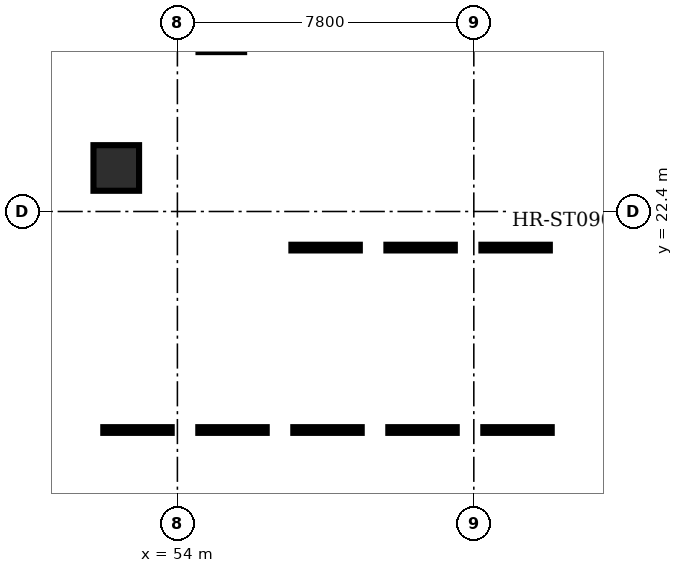
"""IFC4 building model, lengths in metres.
Left out: names, types, materials, properties, quantities, classifications, styles, units other than length and angle.
Written with IfcOpenShell. Run it as: python <this file> out.ifc"""

import sys

from ifc_helpers import new_model, si_unit, direction, frame, origin, origin_2d, place, context, subcontext, project, spatial, hollow_rectangle, extrude, element, save


model = new_model("IFC4")
c1 = context("Model", 3, precision=1e-05, world=origin(), true_north=direction((0.0, 1.0)))
c2 = subcontext(c1, "Body", "Model", "MODEL_VIEW")
j1 = project(units=[si_unit("LENGTHUNIT", "METRE"), si_unit("PLANEANGLEUNIT", "RADIAN")], contexts=[c1])
p1 = place(None, origin())
s1 = spatial("IfcSite", under=j1, at=p1, CompositionType="ELEMENT")
p2 = place(p1, origin())
s2 = spatial("IfcBuilding", under=s1, at=p2, CompositionType="ELEMENT")
p3 = place(p2, frame((0.0, 0.0, -8.16)))
s3 = spatial("IfcBuildingStorey", under=s2, at=p3, CompositionType="ELEMENT", Elevation=-8.16)
for number, where, z_axis, x_axis in (
    (1, (52.391, 23.545, 0.0), (0.0, 0.0, 1.0), (1.0, 0.0, 0.0)),
    (2, (55.156, 27.194, 0.0), (0.0, 0.0, 1.0), (1.0, 0.0, 0.0)),
):
    element("IfcColumn", number, at=place(p3, frame(where, z_axis=z_axis, x_axis=x_axis)), inside=s3, PredefinedType="COLUMN", context=c2, shape_type="SweptSolid", body=[
        extrude(hollow_rectangle(XDim=1.2, YDim=1.2, WallThickness=0.06, at=origin_2d()), origin(), (0.0, 0.0, 1.0), 3.76),
    ])
save(model, sys.argv[1])
